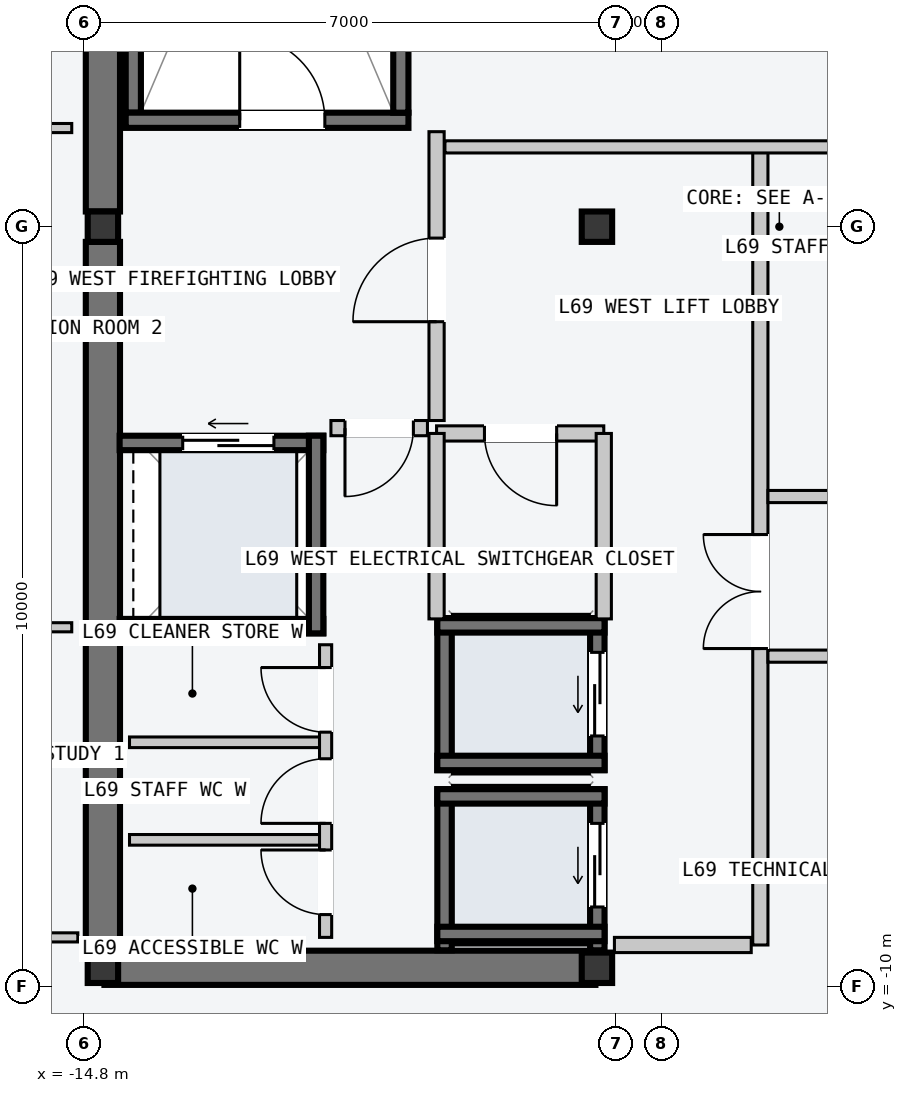
"""IFC4 building model, lengths in metres.
Left out: names, types, materials, properties, quantities, classifications, styles, units other than length and angle.
Written with IfcOpenShell. Run it as: python <this file> out.ifc"""

import sys

from ifc_helpers import new_model, si_unit, direction, frame, frame_2d, origin, origin_2d, place, context, subcontext, project, spatial, rectangle, i_section, extrude, element, fill, save


model = new_model("IFC4")
c1 = context("Model", 3, precision=1e-05, world=origin(), true_north=direction((0.0, 1.0)))
c2 = subcontext(c1, "Body", "Model", "MODEL_VIEW")
j1 = project(units=[si_unit("LENGTHUNIT", "METRE"), si_unit("PLANEANGLEUNIT", "RADIAN")], contexts=[c1])
p1 = place(None, origin())
s1 = spatial("IfcSite", under=j1, at=p1, CompositionType="ELEMENT")
p2 = place(p1, origin())
s2 = spatial("IfcBuilding", under=s1, at=p2, CompositionType="ELEMENT")
p3 = place(p2, frame((0.0, 0.0, 261.6)))
s3 = spatial("IfcBuildingStorey", under=s2, at=p3, CompositionType="ELEMENT", Elevation=261.6)
p4 = place(p3, frame((-14.53, -9.75, -0.2), z_axis=(0.0, 0.0, 1.0), x_axis=(1.0, 0.0, 0.0)))
e1 = element("IfcWall", 1, at=p4, inside=s3, PredefinedType="SHEAR", context=c2, shape_type="SweptSolid", body=[
    extrude(rectangle(XDim=6.46, YDim=0.45, at=frame_2d((3.23, 0.0))), origin(), (0.0, 0.0, 1.0), 3.6),
])
for number, where, z_axis, x_axis in (
    (2, (-14.55, -9.55, -0.2), (0.0, 0.0, 1.0), (0.0, 1.0, 0.0)),
    (3, (-14.55, 0.2, -0.2), (0.0, 0.0, 1.0), (0.0, 1.0, 0.0)),
):
    element("IfcWall", number, at=place(p3, frame(where, z_axis=z_axis, x_axis=x_axis)), inside=s3, PredefinedType="SHEAR", context=c2, shape_type="SweptSolid", body=[
        extrude(rectangle(XDim=9.35, YDim=0.45, at=frame_2d((4.675, 0.0))), origin(), (0.0, 0.0, 1.0), 3.6),
    ])
p5 = place(p3, frame((-14.15, 1.5, -0.2), z_axis=(0.0, 0.0, 1.0), x_axis=(0.0, 1.0, 0.0)))
e4 = element("IfcWall", 4, at=p5, inside=s3, PredefinedType="SOLIDWALL", context=c2, shape_type="SweptSolid", body=[
    extrude(rectangle(XDim=7.8, YDim=0.2, at=frame_2d((3.9, 0.0))), origin(), (0.0, 0.0, 1.0), 3.6),
])
p6 = place(p3, frame((-14.25, 1.4, -0.2), z_axis=(0.0, 0.0, 1.0), x_axis=(1.0, 0.0, 0.0)))
e5 = element("IfcWall", 5, at=p6, inside=s3, PredefinedType="SOLIDWALL", context=c2, shape_type="SweptSolid", body=[
    extrude(rectangle(XDim=3.72, YDim=0.2, at=frame_2d((1.86, 0.0))), origin(), (0.0, 0.0, 1.0), 3.6),
])
p7 = place(p6, frame((1.5, 0.0, 0.2)))
e6 = element("IfcOpeningElement", 6, at=p7, cuts=e5, PredefinedType="OPENING", context=c2, shape_type="SweptSolid", body=[
    extrude(rectangle(XDim=1.12, YDim=2.18, at=frame_2d((0.56, 1.09))), frame((0.0, 0.11, 0.0), z_axis=(0.0, -1.0, 0.0), x_axis=(1.0, 0.0, 0.0)), (0.0, 0.0, 1.0), 0.22),
])
p8 = place(p3, frame((-10.63, 1.5, -0.2), z_axis=(0.0, 0.0, 1.0), x_axis=(0.0, 1.0, 0.0)))
e7 = element("IfcWall", 7, at=p8, inside=s3, PredefinedType="SOLIDWALL", context=c2, shape_type="SweptSolid", body=[
    extrude(rectangle(XDim=7.8, YDim=0.2, at=frame_2d((3.9, 0.0))), origin(), (0.0, 0.0, 1.0), 3.6),
])
for number, where, z_axis, x_axis in (
    (8, (-14.55, -9.75, 0.0), (0.0, 0.0, 1.0), (1.0, 0.0, 0.0)),
    (9, (-14.55, 0.0, 0.0), (0.0, 0.0, 1.0), (1.0, 0.0, 0.0)),
    (10, (-8.05, -9.75, 0.0), (0.0, 0.0, 1.0), (1.0, 0.0, 0.0)),
    (11, (-8.05, 0.0, 0.0), (0.0, 0.0, 1.0), (1.0, 0.0, 0.0)),
):
    element("IfcColumn", number, at=place(p3, frame(where, z_axis=z_axis, x_axis=x_axis)), inside=s3, PredefinedType="COLUMN", context=c2, shape_type="SweptSolid", body=[
        extrude(i_section(OverallWidth=0.4, OverallDepth=0.4, WebThickness=0.013, FlangeThickness=0.021, at=origin_2d()), origin(), (0.0, 0.0, 1.0), 3.6),
    ])
p9 = place(p3, frame((-8.045, -9.52, -0.2), z_axis=(0.0, 0.0, 1.0), x_axis=(0.0, 1.0, 0.0)))
e12 = element("IfcWall", 12, at=p9, inside=s3, PredefinedType="SOLIDWALL", context=c2, shape_type="SweptSolid", body=[
    extrude(rectangle(XDim=2.12, YDim=0.19, at=frame_2d((1.06, 0.0))), origin(), (0.0, 0.0, 1.0), 3.6),
])
p10 = place(p9, frame((0.57, 0.0, 0.2)))
e13 = element("IfcOpeningElement", 13, at=p10, cuts=e12, PredefinedType="OPENING", context=c2, shape_type="SweptSolid", body=[
    extrude(rectangle(XDim=1.1, YDim=2.2, at=frame_2d((0.55, 1.1))), frame((0.0, 0.105, 0.0), z_axis=(0.0, -1.0, 0.0), x_axis=(1.0, 0.0, 0.0)), (0.0, 0.0, 1.0), 0.21),
])
p11 = place(p3, frame((-10.055, -9.52, -0.2), z_axis=(0.0, 0.0, 1.0), x_axis=(0.0, 1.0, 0.0)))
e14 = element("IfcWall", 14, at=p11, inside=s3, PredefinedType="SOLIDWALL", context=c2, shape_type="SweptSolid", body=[
    extrude(rectangle(XDim=2.12, YDim=0.19, at=frame_2d((1.06, 0.0))), origin(), (0.0, 0.0, 1.0), 3.6),
])
for number, where, z_axis, x_axis in (
    (15, (-10.15, -7.495, -0.2), (0.0, 0.0, 1.0), (1.0, 0.0, 0.0)),
    (16, (-10.15, -9.305, -0.2), (0.0, 0.0, 1.0), (1.0, 0.0, 0.0)),
):
    element("IfcWall", number, at=place(p3, frame(where, z_axis=z_axis, x_axis=x_axis)), inside=s3, PredefinedType="SOLIDWALL", context=c2, shape_type="SweptSolid", body=[
        extrude(rectangle(XDim=2.2, YDim=0.19, at=frame_2d((1.1, 0.0))), origin(), (0.0, 0.0, 1.0), 3.6),
    ])
p12 = place(p3, frame((-8.045, -7.15, -0.2), z_axis=(0.0, 0.0, 1.0), x_axis=(0.0, 1.0, 0.0)))
e17 = element("IfcWall", 17, at=p12, inside=s3, PredefinedType="SOLIDWALL", context=c2, shape_type="SweptSolid", body=[
    extrude(rectangle(XDim=2.0, YDim=0.19, at=frame_2d((1.0, 0.0))), origin(), (0.0, 0.0, 1.0), 3.6),
])
p13 = place(p12, frame((0.45, 0.0, 0.2)))
e18 = element("IfcOpeningElement", 18, at=p13, cuts=e17, PredefinedType="OPENING", context=c2, shape_type="SweptSolid", body=[
    extrude(rectangle(XDim=1.1, YDim=2.2, at=frame_2d((0.55, 1.1))), frame((0.0, 0.105, 0.0), z_axis=(0.0, -1.0, 0.0), x_axis=(1.0, 0.0, 0.0)), (0.0, 0.0, 1.0), 0.21),
])
p14 = place(p3, frame((-10.055, -7.15, -0.2), z_axis=(0.0, 0.0, 1.0), x_axis=(0.0, 1.0, 0.0)))
e19 = element("IfcWall", 19, at=p14, inside=s3, PredefinedType="SOLIDWALL", context=c2, shape_type="SweptSolid", body=[
    extrude(rectangle(XDim=2.0, YDim=0.19, at=frame_2d((1.0, 0.0))), origin(), (0.0, 0.0, 1.0), 3.6),
])
for number, where, z_axis, x_axis in (
    (20, (-10.15, -5.245, -0.2), (0.0, 0.0, 1.0), (1.0, 0.0, 0.0)),
    (21, (-10.15, -7.055, -0.2), (0.0, 0.0, 1.0), (1.0, 0.0, 0.0)),
):
    element("IfcWall", number, at=place(p3, frame(where, z_axis=z_axis, x_axis=x_axis)), inside=s3, PredefinedType="SOLIDWALL", context=c2, shape_type="SweptSolid", body=[
        extrude(rectangle(XDim=2.2, YDim=0.19, at=frame_2d((1.1, 0.0))), origin(), (0.0, 0.0, 1.0), 3.6),
    ])
p15 = place(p3, frame((-14.33, -2.845, -0.2), z_axis=(0.0, 0.0, 1.0), x_axis=(1.0, 0.0, 0.0)))
e22 = element("IfcWall", 22, at=p15, inside=s3, PredefinedType="SOLIDWALL", context=c2, shape_type="SweptSolid", body=[
    extrude(rectangle(XDim=2.68, YDim=0.19, at=frame_2d((1.34, 0.0))), origin(), (0.0, 0.0, 1.0), 3.6),
])
p16 = place(p15, frame((0.83, 0.0, 0.2)))
e23 = element("IfcOpeningElement", 23, at=p16, cuts=e22, PredefinedType="OPENING", context=c2, shape_type="SweptSolid", body=[
    extrude(rectangle(XDim=1.2, YDim=2.2, at=frame_2d((0.6, 1.1))), frame((0.0, 0.105, 0.0), z_axis=(0.0, -1.0, 0.0), x_axis=(1.0, 0.0, 0.0)), (0.0, 0.0, 1.0), 0.21),
])
p17 = place(p3, frame((-14.33, -5.255, -0.2), z_axis=(0.0, 0.0, 1.0), x_axis=(1.0, 0.0, 0.0)))
e24 = element("IfcWall", 24, at=p17, inside=s3, PredefinedType="SOLIDWALL", context=c2, shape_type="SweptSolid", body=[
    extrude(rectangle(XDim=2.68, YDim=0.19, at=frame_2d((1.34, 0.0))), origin(), (0.0, 0.0, 1.0), 3.6),
])
p18 = place(p3, frame((-11.745, -5.35, -0.2), z_axis=(0.0, 0.0, 1.0), x_axis=(0.0, 1.0, 0.0)))
e25 = element("IfcWall", 25, at=p18, inside=s3, PredefinedType="SOLIDWALL", context=c2, shape_type="SweptSolid", body=[
    extrude(rectangle(XDim=2.6, YDim=0.19, at=frame_2d((1.3, 0.0))), origin(), (0.0, 0.0, 1.0), 3.6),
])
p19 = place(p3, frame((-5.9, -9.45, 0.0), z_axis=(0.0, 0.0, 1.0), x_axis=(0.0, 1.0, 0.0)))
e26 = element("IfcWall", 26, at=p19, inside=s3, PredefinedType="PARTITIONING", context=c2, shape_type="SweptSolid", body=[
    extrude(rectangle(XDim=10.5, YDim=0.2, at=frame_2d((5.25, 0.0))), origin(), (0.0, 0.0, 1.0), 3.4),
])
p20 = place(p19, frame((3.9, 0.0, 0.0)))
e27 = element("IfcOpeningElement", 27, at=p20, cuts=e26, PredefinedType="OPENING", context=c2, shape_type="SweptSolid", body=[
    extrude(rectangle(XDim=1.5, YDim=2.2, at=frame_2d((0.75, 1.1))), frame((0.0, 0.11, 0.0), z_axis=(0.0, -1.0, 0.0), x_axis=(1.0, 0.0, 0.0)), (0.0, 0.0, 1.0), 0.22),
])
p21 = place(p3, frame((-6.02, -9.45, 0.0), z_axis=(0.0, 0.0, 1.0), x_axis=(-1.0, 0.0, 0.0)))
e28 = element("IfcWall", 28, at=p21, inside=s3, PredefinedType="PARTITIONING", context=c2, shape_type="SweptSolid", body=[
    extrude(rectangle(XDim=1.8, YDim=0.2, at=frame_2d((0.9, 0.0))), origin(), (0.0, 0.0, 1.0), 3.4),
])
p22 = place(p3, frame((-10.16, -2.55, 0.0), z_axis=(0.0, 0.0, 1.0), x_axis=(0.0, 1.0, 0.0)))
e29 = element("IfcWall", 29, at=p22, inside=s3, PredefinedType="PARTITIONING", context=c2, shape_type="SweptSolid", body=[
    extrude(rectangle(XDim=3.8, YDim=0.2, at=frame_2d((1.9, 0.0))), origin(), (0.0, 0.0, 1.0), 3.4),
])
p23 = place(p22, frame((1.3, 0.0, 0.0)))
e30 = element("IfcOpeningElement", 30, at=p23, cuts=e29, PredefinedType="OPENING", context=c2, shape_type="SweptSolid", body=[
    extrude(rectangle(XDim=1.1, YDim=2.15, at=frame_2d((0.55, 1.075))), frame((0.0, 0.11, 0.0), z_axis=(0.0, -1.0, 0.0), x_axis=(1.0, 0.0, 0.0)), (0.0, 0.0, 1.0), 0.22),
])
p24 = place(p3, frame((-10.28, -2.65, 0.0), z_axis=(0.0, 0.0, 1.0), x_axis=(-1.0, 0.0, 0.0)))
e31 = element("IfcWall", 31, at=p24, inside=s3, PredefinedType="PARTITIONING", context=c2, shape_type="SweptSolid", body=[
    extrude(rectangle(XDim=1.27, YDim=0.2, at=frame_2d((0.635, 0.0))), origin(), (0.0, 0.0, 1.0), 3.4),
])
p25 = place(p24, frame((0.185, 0.0, 0.0)))
e32 = element("IfcOpeningElement", 32, at=p25, cuts=e31, PredefinedType="OPENING", context=c2, shape_type="SweptSolid", body=[
    extrude(rectangle(XDim=0.9, YDim=2.15, at=frame_2d((0.45, 1.075))), frame((0.0, 0.11, 0.0), z_axis=(0.0, -1.0, 0.0), x_axis=(1.0, 0.0, 0.0)), (0.0, 0.0, 1.0), 0.22),
])
p26 = place(p3, frame((-7.96, -2.72, 0.0), z_axis=(0.0, 0.0, 1.0), x_axis=(-1.0, 0.0, 0.0)))
e33 = element("IfcWall", 33, at=p26, inside=s3, PredefinedType="PARTITIONING", context=c2, shape_type="SweptSolid", body=[
    extrude(rectangle(XDim=2.2, YDim=0.2, at=frame_2d((1.1, 0.0))), origin(), (0.0, 0.0, 1.0), 3.4),
])
p27 = place(p26, frame((0.62, 0.0, 0.0)))
e34 = element("IfcOpeningElement", 34, at=p27, cuts=e33, PredefinedType="OPENING", context=c2, shape_type="SweptSolid", body=[
    extrude(rectangle(XDim=0.95, YDim=2.1, at=frame_2d((0.475, 1.05))), frame((0.0, 0.11, 0.0), z_axis=(0.0, -1.0, 0.0), x_axis=(1.0, 0.0, 0.0)), (0.0, 0.0, 1.0), 0.22),
])
for number, where, z_axis, x_axis in (
    (35, (-7.96, -5.16, 0.0), (0.0, 0.0, 1.0), (0.0, 1.0, 0.0)),
    (36, (-10.16, -5.16, 0.0), (0.0, 0.0, 1.0), (0.0, 1.0, 0.0)),
):
    element("IfcWall", number, at=place(p3, frame(where, z_axis=z_axis, x_axis=x_axis)), inside=s3, PredefinedType="PARTITIONING", context=c2, shape_type="SweptSolid", body=[
        extrude(rectangle(XDim=2.44, YDim=0.2, at=frame_2d((1.22, 0.0))), origin(), (0.0, 0.0, 1.0), 3.4),
    ])
for number, where, z_axis, x_axis in (
    (37, (-11.7, -8.067, 0.0), (0.0, 0.0, 1.0), (-1.0, 0.0, 0.0)),
    (38, (-11.7, -6.783, 0.0), (0.0, 0.0, 1.0), (-1.0, 0.0, 0.0)),
):
    element("IfcWall", number, at=place(p3, frame(where, z_axis=z_axis, x_axis=x_axis)), inside=s3, PredefinedType="PARTITIONING", context=c2, shape_type="SweptSolid", body=[
        extrude(rectangle(XDim=2.5, YDim=0.14, at=frame_2d((1.25, 0.0))), origin(), (0.0, 0.0, 1.0), 3.4),
    ])
p28 = place(p3, frame((-11.62, -9.35, 0.0), z_axis=(0.0, 0.0, 1.0), x_axis=(0.0, 1.0, 0.0)))
e39 = element("IfcWall", 39, at=p28, inside=s3, PredefinedType="PARTITIONING", context=c2, shape_type="SweptSolid", body=[
    extrude(rectangle(XDim=3.85, YDim=0.16, at=frame_2d((1.925, 0.0))), origin(), (0.0, 0.0, 1.0), 3.4),
])
p29 = place(p28, frame((0.3, 0.0, 0.0)))
e40 = element("IfcOpeningElement", 40, at=p29, cuts=e39, PredefinedType="OPENING", context=c2, shape_type="SweptSolid", body=[
    extrude(rectangle(XDim=0.85, YDim=2.12, at=frame_2d((0.425, 1.06))), frame((0.0, 0.09, 0.0), z_axis=(0.0, -1.0, 0.0), x_axis=(1.0, 0.0, 0.0)), (0.0, 0.0, 1.0), 0.18),
])
p30 = place(p28, frame((1.5, 0.0, 0.0)))
e41 = element("IfcOpeningElement", 41, at=p30, cuts=e39, PredefinedType="OPENING", context=c2, shape_type="SweptSolid", body=[
    extrude(rectangle(XDim=0.85, YDim=2.12, at=frame_2d((0.425, 1.06))), frame((0.0, 0.09, 0.0), z_axis=(0.0, -1.0, 0.0), x_axis=(1.0, 0.0, 0.0)), (0.0, 0.0, 1.0), 0.18),
])
p31 = place(p28, frame((2.7, 0.0, 0.0)))
e42 = element("IfcOpeningElement", 42, at=p31, cuts=e39, PredefinedType="OPENING", context=c2, shape_type="SweptSolid", body=[
    extrude(rectangle(XDim=0.85, YDim=2.12, at=frame_2d((0.425, 1.06))), frame((0.0, 0.09, 0.0), z_axis=(0.0, -1.0, 0.0), x_axis=(1.0, 0.0, 0.0)), (0.0, 0.0, 1.0), 0.18),
])
p32 = place(p3, frame((-10.05, 1.05, 0.0), z_axis=(0.0, 0.0, 1.0), x_axis=(1.0, 0.0, 0.0)))
e43 = element("IfcWall", 43, at=p32, inside=s3, PredefinedType="PARTITIONING", context=c2, shape_type="SweptSolid", body=[
    extrude(rectangle(XDim=7.04, YDim=0.16, at=frame_2d((3.52, 0.0))), origin(), (0.0, 0.0, 1.0), 3.4),
])
for number, where, z_axis, x_axis in (
    (44, (-5.8, -3.55, 0.0), (0.0, 0.0, 1.0), (1.0, 0.0, 0.0)),
    (45, (-5.8, -5.65, 0.0), (0.0, 0.0, 1.0), (1.0, 0.0, 0.0)),
):
    element("IfcWall", number, at=place(p3, frame(where, z_axis=z_axis, x_axis=x_axis)), inside=s3, PredefinedType="PARTITIONING", context=c2, shape_type="SweptSolid", body=[
        extrude(rectangle(XDim=2.79, YDim=0.16, at=frame_2d((1.395, 0.0))), origin(), (0.0, 0.0, 1.0), 3.4),
    ])
p33 = place(p3, frame((-17.55, -9.35, 0.0), z_axis=(0.0, 0.0, 1.0), x_axis=(1.0, 0.0, 0.0)))
e46 = element("IfcWall", 46, at=p33, inside=s3, PredefinedType="PARTITIONING", context=c2, shape_type="SweptSolid", body=[
    extrude(rectangle(XDim=2.67, YDim=0.12, at=frame_2d((1.335, 0.0))), origin(), (0.0, 0.0, 1.0), 3.4),
])
p34 = place(p33, frame((0.855, 0.0, 0.0)))
e47 = element("IfcOpeningElement", 47, at=p34, cuts=e46, PredefinedType="OPENING", context=c2, shape_type="SweptSolid", body=[
    extrude(rectangle(XDim=0.96, YDim=2.18, at=frame_2d((0.48, 1.09))), frame((0.0, 0.07, 0.0), z_axis=(0.0, -1.0, 0.0), x_axis=(1.0, 0.0, 0.0)), (0.0, 0.0, 1.0), 0.14),
])
p35 = place(p3, frame((-17.55, -5.27, 0.0), z_axis=(0.0, 0.0, 1.0), x_axis=(1.0, 0.0, 0.0)))
e48 = element("IfcWall", 48, at=p35, inside=s3, PredefinedType="PARTITIONING", context=c2, shape_type="SweptSolid", body=[
    extrude(rectangle(XDim=2.59, YDim=0.12, at=frame_2d((1.295, 0.0))), origin(), (0.0, 0.0, 1.0), 3.4),
])
p36 = place(p35, frame((0.9, 0.0, 0.0)))
e49 = element("IfcOpeningElement", 49, at=p36, cuts=e48, PredefinedType="OPENING", context=c2, shape_type="SweptSolid", body=[
    extrude(rectangle(XDim=0.96, YDim=2.18, at=frame_2d((0.48, 1.09))), frame((0.0, 0.07, 0.0), z_axis=(0.0, -1.0, 0.0), x_axis=(1.0, 0.0, 0.0)), (0.0, 0.0, 1.0), 0.14),
])
p37 = place(p3, frame((-18.56, 1.298, 0.0), z_axis=(0.0, 0.0, 1.0), x_axis=(1.0, 0.0, 0.0)))
e50 = element("IfcWall", 50, at=p37, inside=s3, PredefinedType="PARTITIONING", context=c2, shape_type="SweptSolid", body=[
    extrude(rectangle(XDim=3.6, YDim=0.12, at=frame_2d((1.8, 0.0))), origin(), (0.0, 0.0, 1.0), 3.4),
])
p38 = place(p37, frame((0.9, 0.0, 0.0)))
e51 = element("IfcOpeningElement", 51, at=p38, cuts=e50, PredefinedType="OPENING", context=c2, shape_type="SweptSolid", body=[
    extrude(rectangle(XDim=0.96, YDim=2.18, at=frame_2d((0.48, 1.09))), frame((0.0, 0.07, 0.0), z_axis=(0.0, -1.0, 0.0), x_axis=(1.0, 0.0, 0.0)), (0.0, 0.0, 1.0), 0.14),
])
p39 = place(p7, origin())
e52 = element("IfcDoor", 52, at=p39, inside=s3, OperationType="SINGLE_SWING_LEFT", PredefinedType="DOOR", context=c2, shape_type="SweptSolid", body=[
    extrude(rectangle(XDim=1.12, YDim=2.18, at=frame_2d((0.56, 1.09))), frame((0.0, 0.025, 0.0), z_axis=(0.0, -1.0, 0.0), x_axis=(1.0, 0.0, 0.0)), (0.0, 0.0, 1.0), 0.05),
])
fill(e6, e52)
p40 = place(p10, origin())
e53 = element("IfcDoor", 53, at=p40, inside=s3, OperationType="SLIDING_TO_LEFT", PredefinedType="DOOR", context=c2, shape_type="SweptSolid", body=[
    extrude(rectangle(XDim=1.1, YDim=2.2, at=frame_2d((0.55, 1.1))), frame((0.0, 0.025, 0.0), z_axis=(0.0, -1.0, 0.0), x_axis=(1.0, 0.0, 0.0)), (0.0, 0.0, 1.0), 0.05),
])
fill(e13, e53)
p41 = place(p13, origin())
e54 = element("IfcDoor", 54, at=p41, inside=s3, OperationType="SLIDING_TO_LEFT", PredefinedType="DOOR", context=c2, shape_type="SweptSolid", body=[
    extrude(rectangle(XDim=1.1, YDim=2.2, at=frame_2d((0.55, 1.1))), frame((0.0, 0.025, 0.0), z_axis=(0.0, -1.0, 0.0), x_axis=(1.0, 0.0, 0.0)), (0.0, 0.0, 1.0), 0.05),
])
fill(e18, e54)
p42 = place(p16, origin())
e55 = element("IfcDoor", 55, at=p42, inside=s3, OperationType="SLIDING_TO_LEFT", PredefinedType="DOOR", context=c2, shape_type="SweptSolid", body=[
    extrude(rectangle(XDim=1.2, YDim=2.2, at=frame_2d((0.6, 1.1))), frame((0.0, 0.025, 0.0), z_axis=(0.0, -1.0, 0.0), x_axis=(1.0, 0.0, 0.0)), (0.0, 0.0, 1.0), 0.05),
])
fill(e23, e55)
p43 = place(p20, origin())
e56 = element("IfcDoor", 56, at=p43, inside=s3, OperationType="DOUBLE_DOOR_SINGLE_SWING", PredefinedType="DOOR", context=c2, shape_type="SweptSolid", body=[
    extrude(rectangle(XDim=1.5, YDim=2.2, at=frame_2d((0.75, 1.1))), frame((0.0, 0.025, 0.0), z_axis=(0.0, -1.0, 0.0), x_axis=(1.0, 0.0, 0.0)), (0.0, 0.0, 1.0), 0.05),
])
fill(e27, e56)
p44 = place(p23, origin())
e57 = element("IfcDoor", 57, at=p44, inside=s3, OperationType="SINGLE_SWING_LEFT", PredefinedType="DOOR", context=c2, shape_type="SweptSolid", body=[
    extrude(rectangle(XDim=1.1, YDim=2.15, at=frame_2d((0.55, 1.075))), frame((0.0, 0.025, 0.0), z_axis=(0.0, -1.0, 0.0), x_axis=(1.0, 0.0, 0.0)), (0.0, 0.0, 1.0), 0.05),
])
fill(e30, e57)
p45 = place(p25, origin())
e58 = element("IfcDoor", 58, at=p45, inside=s3, OperationType="SINGLE_SWING_RIGHT", PredefinedType="DOOR", context=c2, shape_type="SweptSolid", body=[
    extrude(rectangle(XDim=0.9, YDim=2.15, at=frame_2d((0.45, 1.075))), frame((0.0, 0.025, 0.0), z_axis=(0.0, -1.0, 0.0), x_axis=(1.0, 0.0, 0.0)), (0.0, 0.0, 1.0), 0.05),
])
fill(e32, e58)
p46 = place(p27, origin())
e59 = element("IfcDoor", 59, at=p46, inside=s3, OperationType="SINGLE_SWING_LEFT", PredefinedType="DOOR", context=c2, shape_type="SweptSolid", body=[
    extrude(rectangle(XDim=0.95, YDim=2.1, at=frame_2d((0.475, 1.05))), frame((0.0, 0.025, 0.0), z_axis=(0.0, -1.0, 0.0), x_axis=(1.0, 0.0, 0.0)), (0.0, 0.0, 1.0), 0.05),
])
fill(e34, e59)
p47 = place(p29, origin())
e60 = element("IfcDoor", 60, at=p47, inside=s3, OperationType="SINGLE_SWING_RIGHT", PredefinedType="DOOR", context=c2, shape_type="SweptSolid", body=[
    extrude(rectangle(XDim=0.85, YDim=2.12, at=frame_2d((0.425, 1.06))), frame((0.0, 0.025, 0.0), z_axis=(0.0, -1.0, 0.0), x_axis=(1.0, 0.0, 0.0)), (0.0, 0.0, 1.0), 0.05),
])
fill(e40, e60)
p48 = place(p30, origin())
e61 = element("IfcDoor", 61, at=p48, inside=s3, OperationType="SINGLE_SWING_LEFT", PredefinedType="DOOR", context=c2, shape_type="SweptSolid", body=[
    extrude(rectangle(XDim=0.85, YDim=2.12, at=frame_2d((0.425, 1.06))), frame((0.0, 0.025, 0.0), z_axis=(0.0, -1.0, 0.0), x_axis=(1.0, 0.0, 0.0)), (0.0, 0.0, 1.0), 0.05),
])
fill(e41, e61)
p49 = place(p31, origin())
e62 = element("IfcDoor", 62, at=p49, inside=s3, OperationType="SINGLE_SWING_RIGHT", PredefinedType="DOOR", context=c2, shape_type="SweptSolid", body=[
    extrude(rectangle(XDim=0.85, YDim=2.12, at=frame_2d((0.425, 1.06))), frame((0.0, 0.025, 0.0), z_axis=(0.0, -1.0, 0.0), x_axis=(1.0, 0.0, 0.0)), (0.0, 0.0, 1.0), 0.05),
])
fill(e42, e62)
save(model, sys.argv[1])
